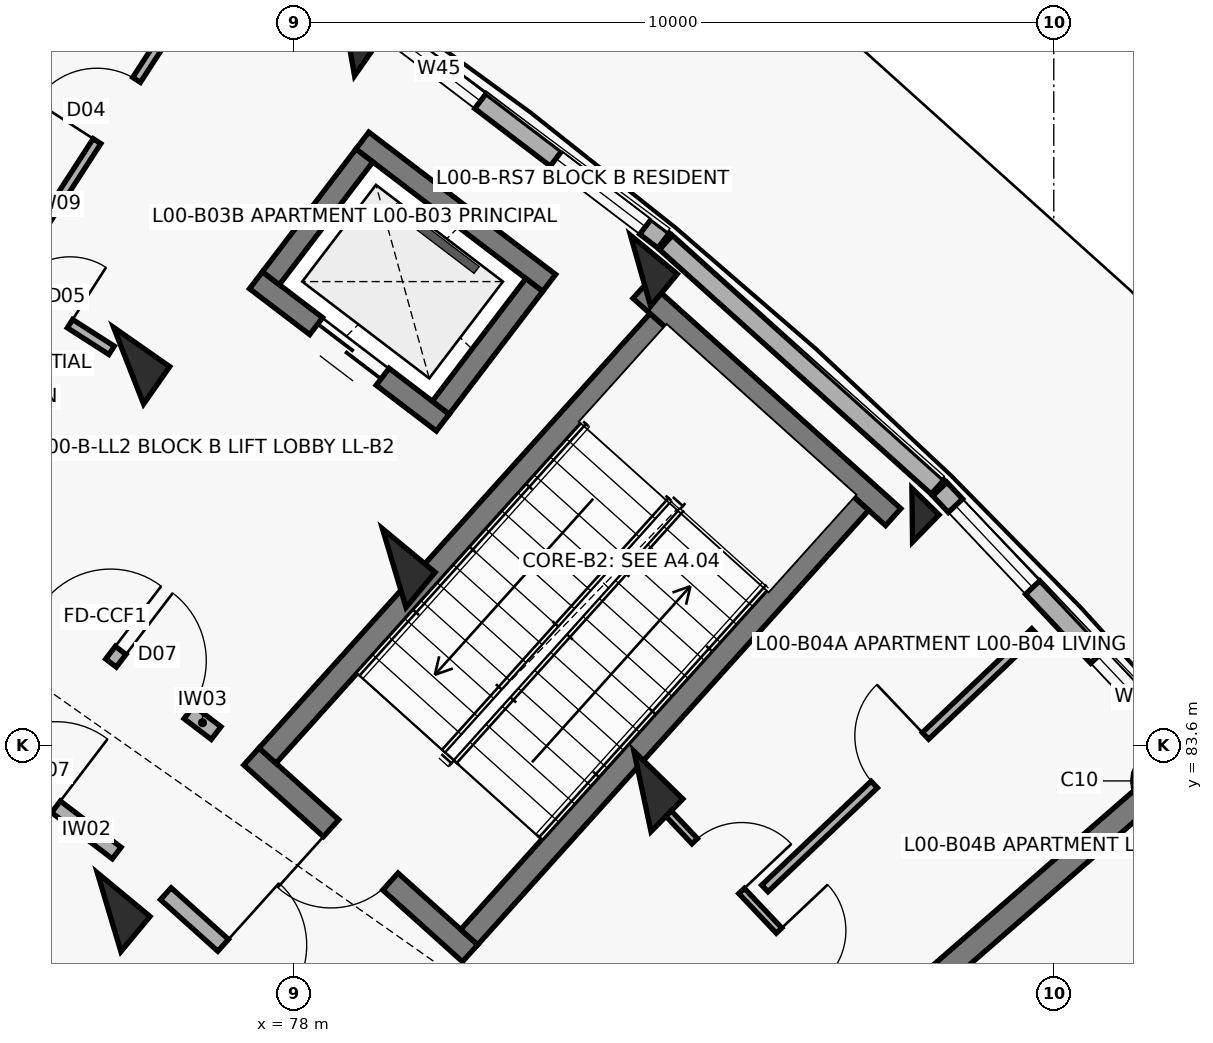
"""IFC4 building model, lengths in metres.
Left out: names, types, materials, properties, quantities, classifications, styles, units other than length and angle.
Written with IfcOpenShell. Run it as: python <this file> out.ifc"""

import sys

from ifc_helpers import new_model, si_unit, direction, frame, frame_2d, origin, origin_2d, place, context, subcontext, project, spatial, rectangle, circle, extrude, element, fill, save


model = new_model("IFC4")
c1 = context("Model", 3, precision=1e-05, world=origin(), true_north=direction((0.0, 1.0)))
c2 = subcontext(c1, "Body", "Model", "MODEL_VIEW")
j1 = project(units=[si_unit("LENGTHUNIT", "METRE"), si_unit("PLANEANGLEUNIT", "RADIAN")], contexts=[c1])
p1 = place(None, origin())
s1 = spatial("IfcSite", under=j1, at=p1, CompositionType="ELEMENT")
p2 = place(p1, origin())
s2 = spatial("IfcBuilding", under=s1, at=p2, CompositionType="ELEMENT")
p3 = place(p2, origin())
s3 = spatial("IfcBuildingStorey", under=s2, at=p3, CompositionType="ELEMENT", Elevation=0.0)
p4 = place(p3, frame((75.828, 88.592, 0.0), z_axis=(0.0, 0.0, 1.0), x_axis=(0.573004420611, 0.819552276527, 0.0)))
e1 = element("IfcColumn", 1, at=p4, inside=s3, PredefinedType="COLUMN", context=c2, shape_type="SweptSolid", body=[
    extrude(rectangle(XDim=0.6, YDim=0.9, at=origin_2d()), origin(), (0.0, 0.0, 1.0), 4.5),
])
p5 = place(p3, frame((78.739, 92.755, 0.0), z_axis=(0.0, 0.0, 1.0), x_axis=(0.573004420611, 0.819552276527, 0.0)))
e2 = element("IfcColumn", 2, at=p5, inside=s3, PredefinedType="COLUMN", context=c2, shape_type="SweptSolid", body=[
    extrude(rectangle(XDim=0.5, YDim=0.5, at=origin_2d()), origin(), (0.0, 0.0, 1.0), 4.5),
])
for number, where, z_axis, x_axis in (
    (3, (75.571, 81.402, 0.0), (0.0, 0.0, 1.0), (0.638, 0.77, 0.0)),
    (4, (79.322, 85.93, 0.0), (0.0, 0.0, 1.0), (0.638, 0.77, 0.0)),
):
    element("IfcColumn", number, at=place(p3, frame(where, z_axis=z_axis, x_axis=x_axis)), inside=s3, PredefinedType="COLUMN", context=c2, shape_type="SweptSolid", body=[
        extrude(rectangle(XDim=0.6, YDim=0.9, at=origin_2d()), origin(), (0.0, 0.0, 1.0), 4.5),
    ])
p6 = place(p3, frame((82.563, 89.842, 0.0), z_axis=(0.0, 0.0, 1.0), x_axis=(0.637961754089, 0.770068049148, 0.0)))
e5 = element("IfcColumn", 5, at=p6, inside=s3, PredefinedType="COLUMN", context=c2, shape_type="SweptSolid", body=[
    extrude(rectangle(XDim=0.55, YDim=0.8, at=origin_2d()), origin(), (0.0, 0.0, 1.0), 4.5),
])
p7 = place(p3, frame((82.588, 82.991, 0.0), z_axis=(0.0, 0.0, 1.0), x_axis=(0.698665066769, 0.715448897181, 0.0)))
e6 = element("IfcColumn", 6, at=p7, inside=s3, PredefinedType="COLUMN", context=c2, shape_type="SweptSolid", body=[
    extrude(rectangle(XDim=0.6, YDim=0.9, at=origin_2d()), origin(), (0.0, 0.0, 1.0), 4.5),
])
p8 = place(p3, frame((86.137, 86.626, 0.0), z_axis=(0.0, 0.0, 1.0), x_axis=(0.698665066769, 0.715448897181, 0.0)))
e7 = element("IfcColumn", 7, at=p8, inside=s3, PredefinedType="COLUMN", context=c2, shape_type="SweptSolid", body=[
    extrude(rectangle(XDim=0.5, YDim=0.5, at=origin_2d()), origin(), (0.0, 0.0, 1.0), 4.5),
])
p9 = place(p3, frame((89.437, 83.129, 0.0), z_axis=(0.0, 0.0, 1.0), x_axis=(0.754709580223, 0.656059028991, 0.0)))
e8 = element("IfcColumn", 8, at=p9, inside=s3, PredefinedType="COLUMN", context=c2, shape_type="SweptSolid", body=[
    extrude(circle(Radius=0.4, at=origin_2d()), origin(), (0.0, 0.0, 1.0), 4.5),
])
p10 = place(p3, frame((85.739, 79.914, 0.0), z_axis=(0.0, 0.0, 1.0), x_axis=(0.754703505217, 0.65606601742, 0.0)))
e9 = element("IfcWall", 9, at=p10, inside=s3, PredefinedType="SHEAR", context=c2, shape_type="SweptSolid", body=[
    extrude(rectangle(XDim=4.72, YDim=0.31, at=frame_2d((2.36, 0.0))), origin(), (0.0, 0.0, 1.0), 4.26),
])
p11 = place(p3, frame((79.041, 93.153, 0.0), z_axis=(0.0, 0.0, 1.0), x_axis=(0.795469013207, -0.605994264848, 0.0)))
e10 = element("IfcWall", 10, at=p11, inside=s3, PredefinedType="SOLIDWALL", context=c2, shape_type="SweptSolid", body=[
    extrude(rectangle(XDim=4.809, YDim=0.248, at=frame_2d((2.404, 0.0))), origin(), (0.0, 0.0, 1.0), 3.45),
])
p12 = place(p11, frame((0.3, 0.0, 0.3)))
e11 = element("IfcOpeningElement", 11, at=p12, cuts=e10, PredefinedType="OPENING", context=c2, shape_type="SweptSolid", body=[
    extrude(rectangle(XDim=1.48, YDim=1.16, at=frame_2d((0.74, 0.58))), frame((0.0, 0.134, 0.0), z_axis=(0.0, -1.0, 0.0), x_axis=(1.0, 0.0, 0.0)), (0.0, 0.0, 1.0), 0.268),
])
p13 = place(p11, frame((3.029, 0.0, 0.3)))
e12 = element("IfcOpeningElement", 12, at=p13, cuts=e10, PredefinedType="OPENING", context=c2, shape_type="SweptSolid", body=[
    extrude(rectangle(XDim=1.48, YDim=1.16, at=frame_2d((0.74, 0.58))), frame((0.0, 0.134, 0.0), z_axis=(0.0, -1.0, 0.0), x_axis=(1.0, 0.0, 0.0)), (0.0, 0.0, 1.0), 0.268),
])
p14 = place(p3, frame((82.897, 90.213, 0.0), z_axis=(0.0, 0.0, 1.0), x_axis=(0.743387539862, -0.668860946369, 0.0)))
e13 = element("IfcWall", 13, at=p14, inside=s3, PredefinedType="SOLIDWALL", context=c2, shape_type="SweptSolid", body=[
    extrude(rectangle(XDim=4.809, YDim=0.252, at=frame_2d((2.405, 0.0))), origin(), (0.0, 0.0, 1.0), 3.45),
])
p15 = place(p3, frame((86.5, 86.969, 0.0), z_axis=(0.0, 0.0, 1.0), x_axis=(0.686350671901, -0.727270757821, 0.0)))
e14 = element("IfcWall", 14, at=p15, inside=s3, PredefinedType="SOLIDWALL", context=c2, shape_type="SweptSolid", body=[
    extrude(rectangle(XDim=4.809, YDim=0.258, at=frame_2d((2.404, 0.0))), origin(), (0.0, 0.0, 1.0), 3.45),
])
p16 = place(p15, frame((0.3, 0.0, 0.3)))
e15 = element("IfcOpeningElement", 15, at=p16, cuts=e14, PredefinedType="OPENING", context=c2, shape_type="SweptSolid", body=[
    extrude(rectangle(XDim=1.48, YDim=1.42, at=frame_2d((0.74, 0.71))), frame((0.0, 0.139, 0.0), z_axis=(0.0, -1.0, 0.0), x_axis=(1.0, 0.0, 0.0)), (0.0, 0.0, 1.0), 0.278),
])
p17 = place(p15, frame((3.029, 0.0, 0.3)))
e16 = element("IfcOpeningElement", 16, at=p17, cuts=e14, PredefinedType="OPENING", context=c2, shape_type="SweptSolid", body=[
    extrude(rectangle(XDim=1.48, YDim=1.42, at=frame_2d((0.74, 0.71))), frame((0.0, 0.139, 0.0), z_axis=(0.0, -1.0, 0.0), x_axis=(1.0, 0.0, 0.0)), (0.0, 0.0, 1.0), 0.278),
])
p18 = place(p3, frame((80.32, 80.862, 0.0), z_axis=(0.0, 0.0, 1.0), x_axis=(-0.743375696158, 0.668874109501, 0.0)))
e17 = element("IfcWall", 17, at=p18, inside=s3, PredefinedType="SHEAR", context=c2, shape_type="SweptSolid", body=[
    extrude(rectangle(XDim=3.87, YDim=0.3, at=frame_2d((1.935, 0.0))), origin(), (0.0, 0.0, 1.0), 4.5),
])
p19 = place(p18, frame((1.41, 0.0, 0.0)))
e18 = element("IfcOpeningElement", 18, at=p19, cuts=e17, PredefinedType="OPENING", context=c2, shape_type="SweptSolid", body=[
    extrude(rectangle(XDim=1.05, YDim=2.15, at=frame_2d((0.525, 1.075))), frame((0.0, 0.16, 0.0), z_axis=(0.0, -1.0, 0.0), x_axis=(1.0, 0.0, 0.0)), (0.0, 0.0, 1.0), 0.32),
])
p20 = place(p3, frame((85.887, 86.601, 0.0), z_axis=(0.0, 0.0, 1.0), x_axis=(-0.743400052815, 0.668847038922, 0.0)))
e19 = element("IfcWall", 19, at=p20, inside=s3, PredefinedType="SHEAR", context=c2, shape_type="SweptSolid", body=[
    extrude(rectangle(XDim=4.47, YDim=0.3, at=frame_2d((2.235, 0.0))), origin(), (0.0, 0.0, 1.0), 4.5),
])
p21 = place(p3, frame((80.309, 81.073, 0.0), z_axis=(0.0, 0.0, 1.0), x_axis=(0.668885797871, 0.743365179038, 0.0)))
e20 = element("IfcWall", 20, at=p21, inside=s3, PredefinedType="SHEAR", context=c2, shape_type="SweptSolid", body=[
    extrude(rectangle(XDim=7.69, YDim=0.3, at=frame_2d((3.845, 0.0))), origin(), (0.0, 0.0, 1.0), 4.5),
])
p22 = place(p3, frame((77.655, 83.461, 0.0), z_axis=(0.0, 0.0, 1.0), x_axis=(0.668868253964, 0.743380964808, 0.0)))
e21 = element("IfcWall", 21, at=p22, inside=s3, PredefinedType="SHEAR", context=c2, shape_type="SweptSolid", body=[
    extrude(rectangle(XDim=7.69, YDim=0.3, at=frame_2d((3.845, 0.0))), origin(), (0.0, 0.0, 1.0), 4.5),
])
p23 = place(p3, frame((79.961, 87.844, 0.0), z_axis=(0.0, 0.0, 1.0), x_axis=(-0.795464365424, 0.606000365793, 0.0)))
e22 = element("IfcWall", 22, at=p23, inside=s3, PredefinedType="SHEAR", context=c2, shape_type="SweptSolid", body=[
    extrude(rectangle(XDim=3.09, YDim=0.28, at=frame_2d((1.545, 0.0))), origin(), (0.0, 0.0, 1.0), 4.5),
])
p24 = place(p23, frame((0.995, 0.0, 0.0)))
e23 = element("IfcOpeningElement", 23, at=p24, cuts=e22, PredefinedType="OPENING", context=c2, shape_type="SweptSolid", body=[
    extrude(rectangle(XDim=1.1, YDim=2.15, at=frame_2d((0.55, 1.075))), frame((0.0, 0.15, 0.0), z_axis=(0.0, -1.0, 0.0), x_axis=(1.0, 0.0, 0.0)), (0.0, 0.0, 1.0), 0.3),
])
p25 = place(p3, frame((81.361, 89.681, 0.0), z_axis=(0.0, 0.0, 1.0), x_axis=(-0.795502452183, 0.605950368076, 0.0)))
e24 = element("IfcWall", 24, at=p25, inside=s3, PredefinedType="SHEAR", context=c2, shape_type="SweptSolid", body=[
    extrude(rectangle(XDim=3.09, YDim=0.28, at=frame_2d((1.545, 0.0))), origin(), (0.0, 0.0, 1.0), 4.5),
])
for number, where, z_axis, x_axis in (
    (25, (79.935, 88.04, 0.0), (0.0, 0.0, 1.0), (0.606, 0.795, 0.0)),
    (26, (77.699, 89.743, 0.0), (0.0, 0.0, 1.0), (0.606, 0.795, 0.0)),
):
    element("IfcWall", number, at=place(p3, frame(where, z_axis=z_axis, x_axis=x_axis)), inside=s3, PredefinedType="SHEAR", context=c2, shape_type="SweptSolid", body=[
        extrude(rectangle(XDim=2.03, YDim=0.28, at=frame_2d((1.015, 0.0))), origin(), (0.0, 0.0, 1.0), 4.5),
    ])
p26 = place(p3, frame((72.405, 90.842, 0.0), z_axis=(0.0, 0.0, 1.0), x_axis=(0.842271400662, -0.539053696423, 0.0)))
e27 = element("IfcWall", 27, at=p26, inside=s3, PredefinedType="PARTITIONING", context=c2, shape_type="SweptSolid", body=[
    extrude(rectangle(XDim=3.797, YDim=0.13, at=frame_2d((1.898, 0.0))), origin(), (0.0, 0.0, 1.0), 3.34),
])
p27 = place(p26, frame((0.65, 0.0, 0.0)))
e28 = element("IfcOpeningElement", 28, at=p27, cuts=e27, PredefinedType="OPENING", context=c2, shape_type="SweptSolid", body=[
    extrude(rectangle(XDim=0.9, YDim=2.1, at=frame_2d((0.45, 1.05))), frame((0.0, 0.075, 0.0), z_axis=(0.0, -1.0, 0.0), x_axis=(1.0, 0.0, 0.0)), (0.0, 0.0, 1.0), 0.15),
])
p28 = place(p26, frame((2.267, 0.0, 0.0)))
e29 = element("IfcOpeningElement", 29, at=p28, cuts=e27, PredefinedType="OPENING", context=c2, shape_type="SweptSolid", body=[
    extrude(rectangle(XDim=0.88, YDim=2.1, at=frame_2d((0.44, 1.05))), frame((0.0, 0.075, 0.0), z_axis=(0.0, -1.0, 0.0), x_axis=(1.0, 0.0, 0.0)), (0.0, 0.0, 1.0), 0.15),
])
p29 = place(p3, frame((74.342, 89.892, 0.0), z_axis=(0.0, 0.0, 1.0), x_axis=(0.542871109654, 0.839816026462, 0.0)))
e30 = element("IfcWall", 30, at=p29, inside=s3, PredefinedType="PARTITIONING", context=c2, shape_type="SweptSolid", body=[
    extrude(rectangle(XDim=4.9, YDim=0.12, at=frame_2d((2.45, 0.0))), origin(), (0.0, 0.0, 1.0), 3.34),
])
p30 = place(p29, frame((1.97, 0.0, 0.0)))
e31 = element("IfcOpeningElement", 31, at=p30, cuts=e30, PredefinedType="OPENING", context=c2, shape_type="SweptSolid", body=[
    extrude(rectangle(XDim=0.96, YDim=2.1, at=frame_2d((0.48, 1.05))), frame((0.0, 0.07, 0.0), z_axis=(0.0, -1.0, 0.0), x_axis=(1.0, 0.0, 0.0)), (0.0, 0.0, 1.0), 0.14),
])
p31 = place(p3, frame((74.357, 85.756, 0.0), z_axis=(0.0, 0.0, 1.0), x_axis=(0.795498026433, -0.605956178235, 0.0)))
e32 = element("IfcWall", 32, at=p31, inside=s3, PredefinedType="SOLIDWALL", context=c2, shape_type="SweptSolid", body=[
    extrude(rectangle(XDim=3.296, YDim=0.21, at=frame_2d((1.648, 0.0))), origin(), (0.0, 0.0, 1.0), 3.34),
])
p32 = place(p31, frame((0.45, 0.0, 0.0)))
e33 = element("IfcOpeningElement", 33, at=p32, cuts=e32, PredefinedType="OPENING", context=c2, shape_type="SweptSolid", body=[
    extrude(rectangle(XDim=1.1, YDim=2.15, at=frame_2d((0.55, 1.075))), frame((0.0, 0.115, 0.0), z_axis=(0.0, -1.0, 0.0), x_axis=(1.0, 0.0, 0.0)), (0.0, 0.0, 1.0), 0.23),
])
p33 = place(p31, frame((1.726, 0.0, 0.0)))
e34 = element("IfcOpeningElement", 34, at=p33, cuts=e32, PredefinedType="OPENING", context=c2, shape_type="SweptSolid", body=[
    extrude(rectangle(XDim=1.12, YDim=2.15, at=frame_2d((0.56, 1.075))), frame((0.0, 0.115, 0.0), z_axis=(0.0, -1.0, 0.0), x_axis=(1.0, 0.0, 0.0)), (0.0, 0.0, 1.0), 0.23),
])
p34 = place(p3, frame((73.182, 84.076, 0.0), z_axis=(0.0, 0.0, 1.0), x_axis=(0.795501577908, -0.605951515838, 0.0)))
e35 = element("IfcWall", 35, at=p34, inside=s3, PredefinedType="SOLIDWALL", context=c2, shape_type="SweptSolid", body=[
    extrude(rectangle(XDim=3.129, YDim=0.19, at=frame_2d((1.564, 0.0))), origin(), (0.0, 0.0, 1.0), 3.34),
])
p35 = place(p34, frame((1.004, 0.0, 0.0)))
e36 = element("IfcOpeningElement", 36, at=p35, cuts=e35, PredefinedType="OPENING", context=c2, shape_type="SweptSolid", body=[
    extrude(rectangle(XDim=1.12, YDim=2.15, at=frame_2d((0.56, 1.075))), frame((0.0, 0.105, 0.0), z_axis=(0.0, -1.0, 0.0), x_axis=(1.0, 0.0, 0.0)), (0.0, 0.0, 1.0), 0.21),
])
p36 = place(p3, frame((76.317, 81.644, 0.0), z_axis=(0.0, 0.0, 1.0), x_axis=(0.743387266925, -0.668861249718, 0.0)))
e37 = element("IfcWall", 37, at=p36, inside=s3, PredefinedType="SOLIDWALL", context=c2, shape_type="SweptSolid", body=[
    extrude(rectangle(XDim=3.128, YDim=0.21, at=frame_2d((1.564, 0.0))), origin(), (0.0, 0.0, 1.0), 3.34),
])
p37 = place(p36, frame((1.014, 0.0, 0.0)))
e38 = element("IfcOpeningElement", 38, at=p37, cuts=e37, PredefinedType="OPENING", context=c2, shape_type="SweptSolid", body=[
    extrude(rectangle(XDim=1.1, YDim=2.15, at=frame_2d((0.55, 1.075))), frame((0.0, 0.115, 0.0), z_axis=(0.0, -1.0, 0.0), x_axis=(1.0, 0.0, 0.0)), (0.0, 0.0, 1.0), 0.23),
])
p38 = place(p3, frame((82.829, 82.809, 0.0), z_axis=(0.0, 0.0, 1.0), x_axis=(0.686300649561, -0.727317962388, 0.0)))
e39 = element("IfcWall", 39, at=p38, inside=s3, PredefinedType="PARTITIONING", context=c2, shape_type="SweptSolid", body=[
    extrude(rectangle(XDim=3.797, YDim=0.1, at=frame_2d((1.899, 0.0))), origin(), (0.0, 0.0, 1.0), 3.34),
])
p39 = place(p38, frame((0.65, 0.0, 0.0)))
e40 = element("IfcOpeningElement", 40, at=p39, cuts=e39, PredefinedType="OPENING", context=c2, shape_type="SweptSolid", body=[
    extrude(rectangle(XDim=0.9, YDim=2.1, at=frame_2d((0.45, 1.05))), frame((0.0, 0.06, 0.0), z_axis=(0.0, -1.0, 0.0), x_axis=(1.0, 0.0, 0.0)), (0.0, 0.0, 1.0), 0.12),
])
p40 = place(p38, frame((2.267, 0.0, 0.0)))
e41 = element("IfcOpeningElement", 41, at=p40, cuts=e39, PredefinedType="OPENING", context=c2, shape_type="SweptSolid", body=[
    extrude(rectangle(XDim=0.88, YDim=2.1, at=frame_2d((0.44, 1.05))), frame((0.0, 0.06, 0.0), z_axis=(0.0, -1.0, 0.0), x_axis=(1.0, 0.0, 0.0)), (0.0, 0.0, 1.0), 0.12),
])
p41 = place(p3, frame((84.198, 81.714, 0.0), z_axis=(0.0, 0.0, 1.0), x_axis=(0.725204659953, 0.688533369694, 0.0)))
e42 = element("IfcWall", 42, at=p41, inside=s3, PredefinedType="PARTITIONING", context=c2, shape_type="SweptSolid", body=[
    extrude(rectangle(XDim=4.9, YDim=0.12, at=frame_2d((2.45, 0.0))), origin(), (0.0, 0.0, 1.0), 3.34),
])
p42 = place(p41, frame((1.985, 0.0, 0.0)))
e43 = element("IfcOpeningElement", 43, at=p42, cuts=e42, PredefinedType="OPENING", context=c2, shape_type="SweptSolid", body=[
    extrude(rectangle(XDim=0.93, YDim=2.1, at=frame_2d((0.465, 1.05))), frame((0.0, 0.07, 0.0), z_axis=(0.0, -1.0, 0.0), x_axis=(1.0, 0.0, 0.0)), (0.0, 0.0, 1.0), 0.14),
])
p43 = place(p12, origin())
e44 = element("IfcWindow", 44, at=p43, inside=s3, PartitioningType="DOUBLE_PANEL_VERTICAL", PredefinedType="WINDOW", context=c2, shape_type="SweptSolid", body=[
    extrude(rectangle(XDim=1.48, YDim=1.16, at=frame_2d((0.74, 0.58))), frame((0.0, 0.03, 0.0), z_axis=(0.0, -1.0, 0.0), x_axis=(1.0, 0.0, 0.0)), (0.0, 0.0, 1.0), 0.06),
])
fill(e11, e44)
p44 = place(p13, origin())
e45 = element("IfcWindow", 45, at=p44, inside=s3, PartitioningType="DOUBLE_PANEL_VERTICAL", PredefinedType="WINDOW", context=c2, shape_type="SweptSolid", body=[
    extrude(rectangle(XDim=1.48, YDim=1.16, at=frame_2d((0.74, 0.58))), frame((0.0, 0.03, 0.0), z_axis=(0.0, -1.0, 0.0), x_axis=(1.0, 0.0, 0.0)), (0.0, 0.0, 1.0), 0.06),
])
fill(e12, e45)
p45 = place(p16, origin())
e46 = element("IfcWindow", 46, at=p45, inside=s3, PartitioningType="DOUBLE_PANEL_VERTICAL", PredefinedType="WINDOW", context=c2, shape_type="SweptSolid", body=[
    extrude(rectangle(XDim=1.48, YDim=1.42, at=frame_2d((0.74, 0.71))), frame((0.0, 0.03, 0.0), z_axis=(0.0, -1.0, 0.0), x_axis=(1.0, 0.0, 0.0)), (0.0, 0.0, 1.0), 0.06),
])
fill(e15, e46)
p46 = place(p17, origin())
e47 = element("IfcWindow", 47, at=p46, inside=s3, PartitioningType="DOUBLE_PANEL_VERTICAL", PredefinedType="WINDOW", context=c2, shape_type="SweptSolid", body=[
    extrude(rectangle(XDim=1.48, YDim=1.42, at=frame_2d((0.74, 0.71))), frame((0.0, 0.03, 0.0), z_axis=(0.0, -1.0, 0.0), x_axis=(1.0, 0.0, 0.0)), (0.0, 0.0, 1.0), 0.06),
])
fill(e16, e47)
p47 = place(p19, origin())
e48 = element("IfcDoor", 48, at=p47, inside=s3, OperationType="SINGLE_SWING_RIGHT", PredefinedType="DOOR", context=c2, shape_type="SweptSolid", body=[
    extrude(rectangle(XDim=1.05, YDim=2.15, at=frame_2d((0.525, 1.075))), frame((0.0, 0.025, 0.0), z_axis=(0.0, -1.0, 0.0), x_axis=(1.0, 0.0, 0.0)), (0.0, 0.0, 1.0), 0.05),
])
fill(e18, e48)
p48 = place(p24, origin())
e49 = element("IfcDoor", 49, at=p48, inside=s3, OperationType="DOUBLE_DOOR_SLIDING", PredefinedType="DOOR", context=c2, shape_type="SweptSolid", body=[
    extrude(rectangle(XDim=1.1, YDim=2.15, at=frame_2d((0.55, 1.075))), frame((0.0, 0.025, 0.0), z_axis=(0.0, -1.0, 0.0), x_axis=(1.0, 0.0, 0.0)), (0.0, 0.0, 1.0), 0.05),
])
fill(e23, e49)
p49 = place(p28, origin())
e50 = element("IfcDoor", 50, at=p49, inside=s3, OperationType="SINGLE_SWING_RIGHT", PredefinedType="DOOR", context=c2, shape_type="SweptSolid", body=[
    extrude(rectangle(XDim=0.88, YDim=2.1, at=frame_2d((0.44, 1.05))), frame((0.0, 0.025, 0.0), z_axis=(0.0, -1.0, 0.0), x_axis=(1.0, 0.0, 0.0)), (0.0, 0.0, 1.0), 0.05),
])
fill(e29, e50)
p50 = place(p30, origin())
e51 = element("IfcDoor", 51, at=p50, inside=s3, OperationType="SINGLE_SWING_LEFT", PredefinedType="DOOR", context=c2, shape_type="SweptSolid", body=[
    extrude(rectangle(XDim=0.96, YDim=2.1, at=frame_2d((0.48, 1.05))), frame((0.0, 0.025, 0.0), z_axis=(0.0, -1.0, 0.0), x_axis=(1.0, 0.0, 0.0)), (0.0, 0.0, 1.0), 0.05),
])
fill(e31, e51)
p51 = place(p32, origin())
e52 = element("IfcDoor", 52, at=p51, inside=s3, OperationType="SINGLE_SWING_RIGHT", PredefinedType="DOOR", context=c2, shape_type="SweptSolid", body=[
    extrude(rectangle(XDim=1.1, YDim=2.15, at=frame_2d((0.55, 1.075))), frame((0.0, 0.025, 0.0), z_axis=(0.0, -1.0, 0.0), x_axis=(1.0, 0.0, 0.0)), (0.0, 0.0, 1.0), 0.05),
])
fill(e33, e52)
p52 = place(p33, origin())
e53 = element("IfcDoor", 53, at=p52, inside=s3, OperationType="SINGLE_SWING_LEFT", PredefinedType="DOOR", context=c2, shape_type="SweptSolid", body=[
    extrude(rectangle(XDim=1.12, YDim=2.15, at=frame_2d((0.56, 1.075))), frame((0.0, 0.025, 0.0), z_axis=(0.0, -1.0, 0.0), x_axis=(1.0, 0.0, 0.0)), (0.0, 0.0, 1.0), 0.05),
])
fill(e34, e53)
p53 = place(p35, origin())
e54 = element("IfcDoor", 54, at=p53, inside=s3, OperationType="SINGLE_SWING_RIGHT", PredefinedType="DOOR", context=c2, shape_type="SweptSolid", body=[
    extrude(rectangle(XDim=1.12, YDim=2.15, at=frame_2d((0.56, 1.075))), frame((0.0, 0.025, 0.0), z_axis=(0.0, -1.0, 0.0), x_axis=(1.0, 0.0, 0.0)), (0.0, 0.0, 1.0), 0.05),
])
fill(e36, e54)
p54 = place(p37, origin())
e55 = element("IfcDoor", 55, at=p54, inside=s3, OperationType="SINGLE_SWING_LEFT", PredefinedType="DOOR", context=c2, shape_type="SweptSolid", body=[
    extrude(rectangle(XDim=1.1, YDim=2.15, at=frame_2d((0.55, 1.075))), frame((0.0, 0.025, 0.0), z_axis=(0.0, -1.0, 0.0), x_axis=(1.0, 0.0, 0.0)), (0.0, 0.0, 1.0), 0.05),
])
fill(e38, e55)
p55 = place(p39, origin())
e56 = element("IfcDoor", 56, at=p55, inside=s3, OperationType="SINGLE_SWING_RIGHT", PredefinedType="DOOR", context=c2, shape_type="SweptSolid", body=[
    extrude(rectangle(XDim=0.9, YDim=2.1, at=frame_2d((0.45, 1.05))), frame((0.0, 0.025, 0.0), z_axis=(0.0, -1.0, 0.0), x_axis=(1.0, 0.0, 0.0)), (0.0, 0.0, 1.0), 0.05),
])
fill(e40, e56)
p56 = place(p40, origin())
e57 = element("IfcDoor", 57, at=p56, inside=s3, OperationType="SINGLE_SWING_LEFT", PredefinedType="DOOR", context=c2, shape_type="SweptSolid", body=[
    extrude(rectangle(XDim=0.88, YDim=2.1, at=frame_2d((0.44, 1.05))), frame((0.0, 0.025, 0.0), z_axis=(0.0, -1.0, 0.0), x_axis=(1.0, 0.0, 0.0)), (0.0, 0.0, 1.0), 0.05),
])
fill(e41, e57)
p57 = place(p42, origin())
e58 = element("IfcDoor", 58, at=p57, inside=s3, OperationType="SINGLE_SWING_RIGHT", PredefinedType="DOOR", context=c2, shape_type="SweptSolid", body=[
    extrude(rectangle(XDim=0.93, YDim=2.1, at=frame_2d((0.465, 1.05))), frame((0.0, 0.025, 0.0), z_axis=(0.0, -1.0, 0.0), x_axis=(1.0, 0.0, 0.0)), (0.0, 0.0, 1.0), 0.05),
])
fill(e43, e58)
save(model, sys.argv[1])
